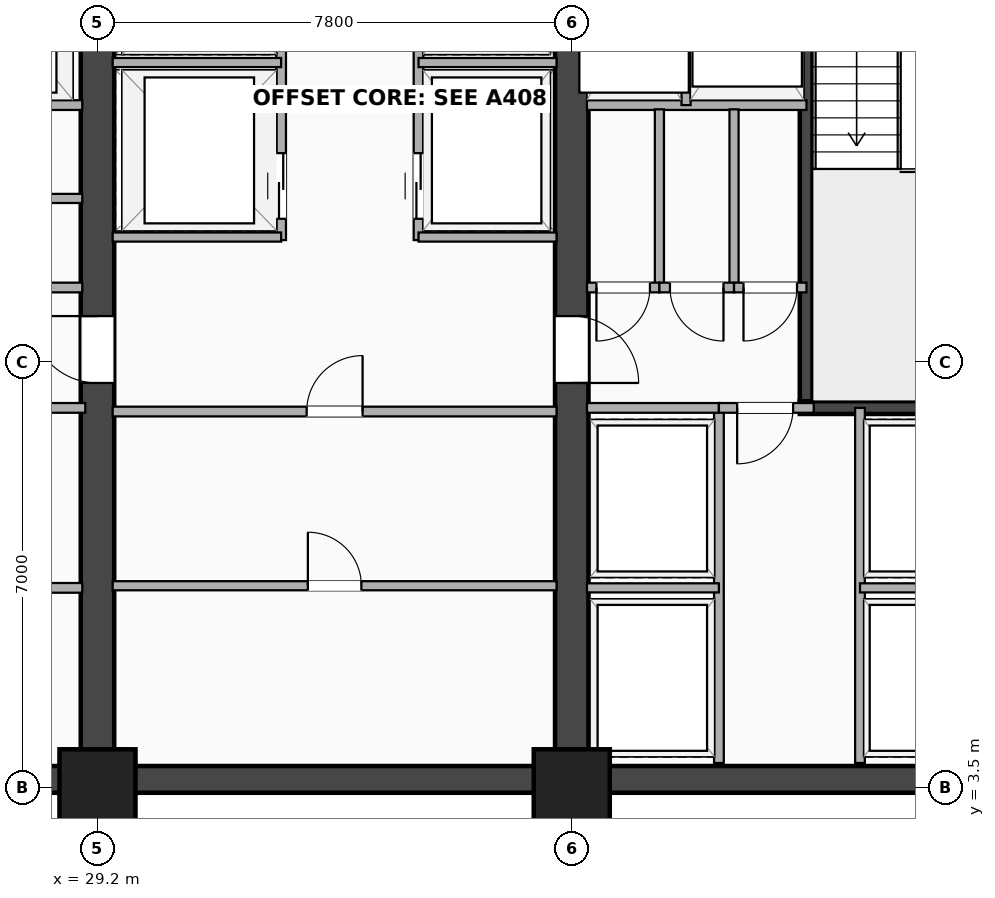
"""IFC4 building model, lengths in metres.
Left out: names, types, materials, properties, quantities, classifications, styles, units other than length and angle.
Written with IfcOpenShell. Run it as: python <this file> out.ifc"""

import sys

from ifc_helpers import new_model, si_unit, direction, frame, frame_2d, origin, origin_2d, place, context, subcontext, project, spatial, rectangle, extrude, element, fill, save


model = new_model("IFC4")
c1 = context("Model", 3, precision=1e-05, world=origin(), true_north=direction((0.0, 1.0)))
c2 = subcontext(c1, "Body", "Model", "MODEL_VIEW")
j1 = project(units=[si_unit("LENGTHUNIT", "METRE"), si_unit("PLANEANGLEUNIT", "RADIAN")], contexts=[c1])
p1 = place(None, origin())
s1 = spatial("IfcSite", under=j1, at=p1, CompositionType="ELEMENT")
p2 = place(p1, origin())
s2 = spatial("IfcBuilding", under=s1, at=p2, CompositionType="ELEMENT")
p3 = place(p2, frame((0.0, 0.0, 91.7)))
s3 = spatial("IfcBuildingStorey", under=s2, at=p3, CompositionType="ELEMENT", Elevation=91.7)
p4 = place(p3, frame((20.3, 3.63, 0.0), z_axis=(0.0, 0.0, 1.0), x_axis=(1.0, 0.0, 0.0)))
e1 = element("IfcWall", 1, at=p4, inside=s3, PredefinedType="SHEAR", context=c2, shape_type="SweptSolid", body=[
    extrude(rectangle(XDim=24.5, YDim=0.44, at=frame_2d((12.25, 0.0))), origin(), (0.0, 0.0, 1.0), 3.24),
])
p5 = place(p3, frame((29.2, 3.5, 0.0), z_axis=(0.0, 0.0, 1.0), x_axis=(0.0, 1.0, 0.0)))
e2 = element("IfcWall", 2, at=p5, inside=s3, PredefinedType="SHEAR", context=c2, shape_type="SweptSolid", body=[
    extrude(rectangle(XDim=16.9, YDim=0.55, at=frame_2d((8.45, 0.0))), origin(), (0.0, 0.0, 1.0), 3.24),
])
p6 = place(p5, frame((7.75, 0.0, 0.0), z_axis=(0.0, 0.0, 1.0), x_axis=(-1.0, 0.0, 0.0)))
e3 = element("IfcOpeningElement", 3, at=p6, cuts=e2, PredefinedType="OPENING", context=c2, shape_type="SweptSolid", body=[
    extrude(rectangle(XDim=1.1, YDim=2.15, at=frame_2d((0.55, 1.075))), frame((0.0, 0.285, 0.0), z_axis=(0.0, -1.0, 0.0), x_axis=(1.0, 0.0, 0.0)), (0.0, 0.0, 1.0), 0.57),
])
p7 = place(p3, frame((37.0, 3.5, 0.0), z_axis=(0.0, 0.0, 1.0), x_axis=(0.0, 1.0, 0.0)))
e4 = element("IfcWall", 4, at=p7, inside=s3, PredefinedType="SHEAR", context=c2, shape_type="SweptSolid", body=[
    extrude(rectangle(XDim=16.9, YDim=0.55, at=frame_2d((8.45, 0.0))), origin(), (0.0, 0.0, 1.0), 3.24),
])
p8 = place(p7, frame((6.65, 0.0, 0.0)))
e5 = element("IfcOpeningElement", 5, at=p8, cuts=e4, PredefinedType="OPENING", context=c2, shape_type="SweptSolid", body=[
    extrude(rectangle(XDim=1.1, YDim=2.15, at=frame_2d((0.55, 1.075))), frame((0.0, 0.285, 0.0), z_axis=(0.0, -1.0, 0.0), x_axis=(1.0, 0.0, 0.0)), (0.0, 0.0, 1.0), 0.57),
])
p9 = place(p3, frame((40.855, 9.745, 0.0), z_axis=(0.0, 0.0, 1.0), x_axis=(0.0, 1.0, 0.0)))
e6 = element("IfcWall", 6, at=p9, inside=s3, PredefinedType="SHEAR", context=c2, shape_type="SweptSolid", body=[
    extrude(rectangle(XDim=8.01, YDim=0.21, at=frame_2d((4.005, 0.0))), origin(), (0.0, 0.0, 1.0), 3.24),
])
p10 = place(p3, frame((40.75, 9.745, 0.0), z_axis=(0.0, 0.0, 1.0), x_axis=(1.0, 0.0, 0.0)))
e7 = element("IfcWall", 7, at=p10, inside=s3, PredefinedType="SHEAR", context=c2, shape_type="SweptSolid", body=[
    extrude(rectangle(XDim=3.66, YDim=0.21, at=frame_2d((1.83, 0.0))), origin(), (0.0, 0.0, 1.0), 3.24),
])
for number, where, z_axis, x_axis in (
    (8, (29.2, 3.5, -0.26), (0.0, 0.0, 1.0), (1.0, 0.0, 0.0)),
    (9, (37.0, 3.5, -0.26), (0.0, 0.0, 1.0), (1.0, 0.0, 0.0)),
):
    element("IfcColumn", number, at=place(p3, frame(where, z_axis=z_axis, x_axis=x_axis)), inside=s3, PredefinedType="COLUMN", context=c2, shape_type="SweptSolid", body=[
        extrude(rectangle(XDim=1.25, YDim=1.25, at=origin_2d()), origin(), (0.0, 0.0, 1.0), 3.5),
    ])
p11 = place(p3, frame((24.22, 14.72, 0.0), z_axis=(0.0, 0.0, 1.0), x_axis=(1.0, 0.0, 0.0)))
e10 = element("IfcWall", 10, at=p11, inside=s3, PredefinedType="PARTITIONING", context=c2, shape_type="SweptSolid", body=[
    extrude(rectangle(XDim=4.73, YDim=0.16, at=frame_2d((2.365, 0.0))), origin(), (0.0, 0.0, 1.0), 3.24),
])
p12 = place(p3, frame((37.25, 14.72, 0.0), z_axis=(0.0, 0.0, 1.0), x_axis=(1.0, 0.0, 0.0)))
e11 = element("IfcWall", 11, at=p12, inside=s3, PredefinedType="PARTITIONING", context=c2, shape_type="SweptSolid", body=[
    extrude(rectangle(XDim=3.61, YDim=0.16, at=frame_2d((1.805, 0.0))), origin(), (0.0, 0.0, 1.0), 3.24),
])
p13 = place(p3, frame((38.88, 14.72, 0.0), z_axis=(0.0, 0.0, 1.0), x_axis=(0.0, 1.0, 0.0)))
e12 = element("IfcWall", 12, at=p13, inside=s3, PredefinedType="PARTITIONING", context=c2, shape_type="SweptSolid", body=[
    extrude(rectangle(XDim=3.04, YDim=0.15, at=frame_2d((1.52, 0.0))), origin(), (0.0, 0.0, 1.0), 3.24),
])
p14 = place(p3, frame((24.22, 11.72, 0.0), z_axis=(0.0, 0.0, 1.0), x_axis=(1.0, 0.0, 0.0)))
e13 = element("IfcWall", 13, at=p14, inside=s3, PredefinedType="PARTITIONING", context=c2, shape_type="SweptSolid", body=[
    extrude(rectangle(XDim=4.73, YDim=0.16, at=frame_2d((2.365, 0.0))), origin(), (0.0, 0.0, 1.0), 3.24),
])
p15 = place(p14, frame((1.905, 0.0, 0.0)))
e14 = element("IfcOpeningElement", 14, at=p15, cuts=e13, PredefinedType="OPENING", context=c2, shape_type="SweptSolid", body=[
    extrude(rectangle(XDim=0.92, YDim=2.08, at=frame_2d((0.46, 1.04))), frame((0.0, 0.09, 0.0), z_axis=(0.0, -1.0, 0.0), x_axis=(1.0, 0.0, 0.0)), (0.0, 0.0, 1.0), 0.18),
])
p16 = place(p3, frame((24.22, 13.185, 0.0), z_axis=(0.0, 0.0, 1.0), x_axis=(1.0, 0.0, 0.0)))
e15 = element("IfcWall", 15, at=p16, inside=s3, PredefinedType="PARTITIONING", context=c2, shape_type="SweptSolid", body=[
    extrude(rectangle(XDim=4.73, YDim=0.15, at=frame_2d((2.365, 0.0))), origin(), (0.0, 0.0, 1.0), 3.24),
])
p17 = place(p16, frame((1.925, 0.0, 0.0)))
e16 = element("IfcOpeningElement", 16, at=p17, cuts=e15, PredefinedType="OPENING", context=c2, shape_type="SweptSolid", body=[
    extrude(rectangle(XDim=0.88, YDim=2.08, at=frame_2d((0.44, 1.04))), frame((0.0, 0.085, 0.0), z_axis=(0.0, -1.0, 0.0), x_axis=(1.0, 0.0, 0.0)), (0.0, 0.0, 1.0), 0.17),
])
p18 = place(p3, frame((38.441, 11.72, 0.0), z_axis=(0.0, 0.0, 1.0), x_axis=(0.0, 1.0, 0.0)))
e17 = element("IfcWall", 17, at=p18, inside=s3, PredefinedType="PARTITIONING", context=c2, shape_type="SweptSolid", body=[
    extrude(rectangle(XDim=2.93, YDim=0.15, at=frame_2d((1.465, 0.0))), origin(), (0.0, 0.0, 1.0), 3.24),
])
p19 = place(p3, frame((37.25, 11.72, 0.0), z_axis=(0.0, 0.0, 1.0), x_axis=(1.0, 0.0, 0.0)))
e18 = element("IfcWall", 18, at=p19, inside=s3, PredefinedType="PARTITIONING", context=c2, shape_type="SweptSolid", body=[
    extrude(rectangle(XDim=1.191, YDim=0.16, at=frame_2d((0.596, 0.0))), origin(), (0.0, 0.0, 1.0), 3.24),
])
p20 = place(p19, frame((0.156, 0.0, 0.0)))
e19 = element("IfcOpeningElement", 19, at=p20, cuts=e18, PredefinedType="OPENING", context=c2, shape_type="SweptSolid", body=[
    extrude(rectangle(XDim=0.88, YDim=2.08, at=frame_2d((0.44, 1.04))), frame((0.0, 0.09, 0.0), z_axis=(0.0, -1.0, 0.0), x_axis=(1.0, 0.0, 0.0)), (0.0, 0.0, 1.0), 0.18),
])
p21 = place(p3, frame((39.669, 11.72, 0.0), z_axis=(0.0, 0.0, 1.0), x_axis=(0.0, 1.0, 0.0)))
e20 = element("IfcWall", 20, at=p21, inside=s3, PredefinedType="PARTITIONING", context=c2, shape_type="SweptSolid", body=[
    extrude(rectangle(XDim=2.93, YDim=0.15, at=frame_2d((1.465, 0.0))), origin(), (0.0, 0.0, 1.0), 3.24),
])
p22 = place(p3, frame((38.441, 11.72, 0.0), z_axis=(0.0, 0.0, 1.0), x_axis=(1.0, 0.0, 0.0)))
e21 = element("IfcWall", 21, at=p22, inside=s3, PredefinedType="PARTITIONING", context=c2, shape_type="SweptSolid", body=[
    extrude(rectangle(XDim=1.227, YDim=0.16, at=frame_2d((0.614, 0.0))), origin(), (0.0, 0.0, 1.0), 3.24),
])
p23 = place(p22, frame((0.174, 0.0, 0.0)))
e22 = element("IfcOpeningElement", 22, at=p23, cuts=e21, PredefinedType="OPENING", context=c2, shape_type="SweptSolid", body=[
    extrude(rectangle(XDim=0.88, YDim=2.08, at=frame_2d((0.44, 1.04))), frame((0.0, 0.09, 0.0), z_axis=(0.0, -1.0, 0.0), x_axis=(1.0, 0.0, 0.0)), (0.0, 0.0, 1.0), 0.18),
])
p24 = place(p3, frame((39.669, 11.72, 0.0), z_axis=(0.0, 0.0, 1.0), x_axis=(1.0, 0.0, 0.0)))
e23 = element("IfcWall", 23, at=p24, inside=s3, PredefinedType="PARTITIONING", context=c2, shape_type="SweptSolid", body=[
    extrude(rectangle(XDim=1.191, YDim=0.16, at=frame_2d((0.596, 0.0))), origin(), (0.0, 0.0, 1.0), 3.24),
])
p25 = place(p24, frame((0.156, 0.0, 0.0)))
e24 = element("IfcOpeningElement", 24, at=p25, cuts=e23, PredefinedType="OPENING", context=c2, shape_type="SweptSolid", body=[
    extrude(rectangle(XDim=0.88, YDim=2.08, at=frame_2d((0.44, 1.04))), frame((0.0, 0.09, 0.0), z_axis=(0.0, -1.0, 0.0), x_axis=(1.0, 0.0, 0.0)), (0.0, 0.0, 1.0), 0.18),
])
p26 = place(p3, frame((20.65, 6.78, 0.0), z_axis=(0.0, 0.0, 1.0), x_axis=(1.0, 0.0, 0.0)))
e25 = element("IfcWall", 25, at=p26, inside=s3, PredefinedType="PARTITIONING", context=c2, shape_type="SweptSolid", body=[
    extrude(rectangle(XDim=8.3, YDim=0.16, at=frame_2d((4.15, 0.0))), origin(), (0.0, 0.0, 1.0), 2.313),
])
p27 = place(p26, frame((3.695, 0.0, 0.0)))
e26 = element("IfcOpeningElement", 26, at=p27, cuts=e25, PredefinedType="OPENING", context=c2, shape_type="SweptSolid", body=[
    extrude(rectangle(XDim=1.15, YDim=2.2, at=frame_2d((0.575, 1.1))), frame((0.0, 0.09, 0.0), z_axis=(0.0, -1.0, 0.0), x_axis=(1.0, 0.0, 0.0)), (0.0, 0.0, 1.0), 0.18),
])
p28 = place(p26, frame((5.492, 0.0, 0.0)))
e27 = element("IfcOpeningElement", 27, at=p28, cuts=e25, PredefinedType="OPENING", context=c2, shape_type="SweptSolid", body=[
    extrude(rectangle(XDim=1.15, YDim=2.2, at=frame_2d((0.575, 1.1))), frame((0.0, 0.09, 0.0), z_axis=(0.0, -1.0, 0.0), x_axis=(1.0, 0.0, 0.0)), (0.0, 0.0, 1.0), 0.18),
])
p29 = place(p26, frame((1.059, 0.0, 0.0)))
e28 = element("IfcOpeningElement", 28, at=p29, cuts=e25, PredefinedType="OPENING", context=c2, shape_type="SweptSolid", body=[
    extrude(rectangle(XDim=1.15, YDim=2.2, at=frame_2d((0.575, 1.1))), frame((0.0, 0.09, 0.0), z_axis=(0.0, -1.0, 0.0), x_axis=(1.0, 0.0, 0.0)), (0.0, 0.0, 1.0), 0.18),
])
p30 = place(p3, frame((24.2, 9.74, 0.0), z_axis=(0.0, 0.0, 1.0), x_axis=(1.0, 0.0, 0.0)))
e29 = element("IfcWall", 29, at=p30, inside=s3, PredefinedType="PARTITIONING", context=c2, shape_type="SweptSolid", body=[
    extrude(rectangle(XDim=4.8, YDim=0.16, at=frame_2d((2.4, 0.0))), origin(), (0.0, 0.0, 1.0), 3.24),
])
p31 = place(p30, frame((1.85, 0.0, 0.0)))
e30 = element("IfcOpeningElement", 30, at=p31, cuts=e29, PredefinedType="OPENING", context=c2, shape_type="SweptSolid", body=[
    extrude(rectangle(XDim=1.1, YDim=2.15, at=frame_2d((0.55, 1.075))), frame((0.0, 0.09, 0.0), z_axis=(0.0, -1.0, 0.0), x_axis=(1.0, 0.0, 0.0)), (0.0, 0.0, 1.0), 0.18),
])
for number, where, z_axis, x_axis in (
    (31, (39.42, 3.9, 0.0), (0.0, 0.0, 1.0), (0.0, 1.0, 0.0)),
    (32, (41.74, 3.9, 0.0), (0.0, 0.0, 1.0), (0.0, 1.0, 0.0)),
):
    element("IfcWall", number, at=place(p3, frame(where, z_axis=z_axis, x_axis=x_axis)), inside=s3, PredefinedType="PARTITIONING", context=c2, shape_type="SweptSolid", body=[
        extrude(rectangle(XDim=5.84, YDim=0.16, at=frame_2d((2.92, 0.0))), origin(), (0.0, 0.0, 1.0), 3.24),
    ])
p32 = place(p3, frame((37.25, 6.78, 0.0), z_axis=(0.0, 0.0, 1.0), x_axis=(1.0, 0.0, 0.0)))
e33 = element("IfcWall", 33, at=p32, inside=s3, PredefinedType="PARTITIONING", context=c2, shape_type="SweptSolid", body=[
    extrude(rectangle(XDim=2.17, YDim=0.15, at=frame_2d((1.085, 0.0))), origin(), (0.0, 0.0, 1.0), 3.24),
])
p33 = place(p3, frame((41.74, 6.78, 0.0), z_axis=(0.0, 0.0, 1.0), x_axis=(1.0, 0.0, 0.0)))
e34 = element("IfcWall", 34, at=p33, inside=s3, PredefinedType="PARTITIONING", context=c2, shape_type="SweptSolid", body=[
    extrude(rectangle(XDim=2.66, YDim=0.15, at=frame_2d((1.33, 0.0))), origin(), (0.0, 0.0, 1.0), 2.313),
])
p34 = place(p3, frame((37.25, 9.74, 0.0), z_axis=(0.0, 0.0, 1.0), x_axis=(1.0, 0.0, 0.0)))
e35 = element("IfcWall", 35, at=p34, inside=s3, PredefinedType="PARTITIONING", context=c2, shape_type="SweptSolid", body=[
    extrude(rectangle(XDim=2.17, YDim=0.16, at=frame_2d((1.085, 0.0))), origin(), (0.0, 0.0, 1.0), 3.24),
])
p35 = place(p3, frame((39.42, 9.74, 0.0), z_axis=(0.0, 0.0, 1.0), x_axis=(1.0, 0.0, 0.0)))
e36 = element("IfcWall", 36, at=p35, inside=s3, PredefinedType="PARTITIONING", context=c2, shape_type="SweptSolid", body=[
    extrude(rectangle(XDim=1.56, YDim=0.16, at=frame_2d((0.78, 0.0))), origin(), (0.0, 0.0, 1.0), 3.24),
])
p36 = place(p35, frame((0.3, 0.0, 0.0)))
e37 = element("IfcOpeningElement", 37, at=p36, cuts=e36, PredefinedType="OPENING", context=c2, shape_type="SweptSolid", body=[
    extrude(rectangle(XDim=0.92, YDim=2.08, at=frame_2d((0.46, 1.04))), frame((0.0, 0.09, 0.0), z_axis=(0.0, -1.0, 0.0), x_axis=(1.0, 0.0, 0.0)), (0.0, 0.0, 1.0), 0.18),
])
p37 = place(p3, frame((29.45, 9.68, 0.0), z_axis=(0.0, 0.0, 1.0), x_axis=(1.0, 0.0, 0.0)))
e38 = element("IfcWall", 38, at=p37, inside=s3, PredefinedType="PARTITIONING", context=c2, shape_type="SweptSolid", body=[
    extrude(rectangle(XDim=7.3, YDim=0.16, at=frame_2d((3.65, 0.0))), origin(), (0.0, 0.0, 1.0), 3.24),
])
p38 = place(p37, frame((4.11, 0.0, 0.0), z_axis=(0.0, 0.0, 1.0), x_axis=(-1.0, 0.0, 0.0)))
e39 = element("IfcOpeningElement", 39, at=p38, cuts=e38, PredefinedType="OPENING", context=c2, shape_type="SweptSolid", body=[
    extrude(rectangle(XDim=0.92, YDim=2.08, at=frame_2d((0.46, 1.04))), frame((0.0, 0.09, 0.0), z_axis=(0.0, -1.0, 0.0), x_axis=(1.0, 0.0, 0.0)), (0.0, 0.0, 1.0), 0.18),
])
p39 = place(p3, frame((29.45, 6.815, 0.0), z_axis=(0.0, 0.0, 1.0), x_axis=(1.0, 0.0, 0.0)))
e40 = element("IfcWall", 40, at=p39, inside=s3, PredefinedType="PARTITIONING", context=c2, shape_type="SweptSolid", body=[
    extrude(rectangle(XDim=7.3, YDim=0.15, at=frame_2d((3.65, 0.0))), origin(), (0.0, 0.0, 1.0), 3.24),
])
p40 = place(p39, frame((4.09, 0.0, 0.0), z_axis=(0.0, 0.0, 1.0), x_axis=(-1.0, 0.0, 0.0)))
e41 = element("IfcOpeningElement", 41, at=p40, cuts=e40, PredefinedType="OPENING", context=c2, shape_type="SweptSolid", body=[
    extrude(rectangle(XDim=0.88, YDim=2.08, at=frame_2d((0.44, 1.04))), frame((0.0, 0.085, 0.0), z_axis=(0.0, -1.0, 0.0), x_axis=(1.0, 0.0, 0.0)), (0.0, 0.0, 1.0), 0.17),
])
p41 = place(p3, frame((32.22, 12.5, 0.0), z_axis=(0.0, 0.0, 1.0), x_axis=(0.0, 1.0, 0.0)))
e42 = element("IfcWall", 42, at=p41, inside=s3, PredefinedType="PARTITIONING", context=c2, shape_type="SweptSolid", body=[
    extrude(rectangle(XDim=7.92, YDim=0.16, at=frame_2d((3.96, 0.0))), origin(), (0.0, 0.0, 1.0), 2.614),
])
p42 = place(p41, frame((1.43, 0.0, 0.0), z_axis=(0.0, 0.0, 1.0), x_axis=(-1.0, 0.0, 0.0)))
e43 = element("IfcOpeningElement", 43, at=p42, cuts=e42, PredefinedType="OPENING", context=c2, shape_type="SweptSolid", body=[
    extrude(rectangle(XDim=1.08, YDim=2.16, at=frame_2d((0.54, 1.08))), frame((0.0, 0.09, 0.0), z_axis=(0.0, -1.0, 0.0), x_axis=(1.0, 0.0, 0.0)), (0.0, 0.0, 1.0), 0.18),
])
p43 = place(p41, frame((4.33, 0.0, 0.0), z_axis=(0.0, 0.0, 1.0), x_axis=(-1.0, 0.0, 0.0)))
e44 = element("IfcOpeningElement", 44, at=p43, cuts=e42, PredefinedType="OPENING", context=c2, shape_type="SweptSolid", body=[
    extrude(rectangle(XDim=1.08, YDim=2.16, at=frame_2d((0.54, 1.08))), frame((0.0, 0.09, 0.0), z_axis=(0.0, -1.0, 0.0), x_axis=(1.0, 0.0, 0.0)), (0.0, 0.0, 1.0), 0.18),
])
p44 = place(p41, frame((6.1, 0.0, 0.0)))
e45 = element("IfcOpeningElement", 45, at=p44, cuts=e42, PredefinedType="OPENING", context=c2, shape_type="SweptSolid", body=[
    extrude(rectangle(XDim=0.88, YDim=2.08, at=frame_2d((0.44, 1.04))), frame((0.0, 0.09, 0.0), z_axis=(0.0, -1.0, 0.0), x_axis=(1.0, 0.0, 0.0)), (0.0, 0.0, 1.0), 0.18),
])
p45 = place(p3, frame((34.48, 12.5, 0.0), z_axis=(0.0, 0.0, 1.0), x_axis=(0.0, 1.0, 0.0)))
e46 = element("IfcWall", 46, at=p45, inside=s3, PredefinedType="PARTITIONING", context=c2, shape_type="SweptSolid", body=[
    extrude(rectangle(XDim=7.92, YDim=0.16, at=frame_2d((3.96, 0.0))), origin(), (0.0, 0.0, 1.0), 2.614),
])
p46 = place(p45, frame((0.35, 0.0, 0.0)))
e47 = element("IfcOpeningElement", 47, at=p46, cuts=e46, PredefinedType="OPENING", context=c2, shape_type="SweptSolid", body=[
    extrude(rectangle(XDim=1.08, YDim=2.16, at=frame_2d((0.54, 1.08))), frame((0.0, 0.09, 0.0), z_axis=(0.0, -1.0, 0.0), x_axis=(1.0, 0.0, 0.0)), (0.0, 0.0, 1.0), 0.18),
])
p47 = place(p45, frame((3.25, 0.0, 0.0)))
e48 = element("IfcOpeningElement", 48, at=p47, cuts=e46, PredefinedType="OPENING", context=c2, shape_type="SweptSolid", body=[
    extrude(rectangle(XDim=1.08, YDim=2.16, at=frame_2d((0.54, 1.08))), frame((0.0, 0.09, 0.0), z_axis=(0.0, -1.0, 0.0), x_axis=(1.0, 0.0, 0.0)), (0.0, 0.0, 1.0), 0.18),
])
p48 = place(p45, frame((6.98, 0.0, 0.0), z_axis=(0.0, 0.0, 1.0), x_axis=(-1.0, 0.0, 0.0)))
e49 = element("IfcOpeningElement", 49, at=p48, cuts=e46, PredefinedType="OPENING", context=c2, shape_type="SweptSolid", body=[
    extrude(rectangle(XDim=0.88, YDim=2.08, at=frame_2d((0.44, 1.04))), frame((0.0, 0.09, 0.0), z_axis=(0.0, -1.0, 0.0), x_axis=(1.0, 0.0, 0.0)), (0.0, 0.0, 1.0), 0.18),
])
p49 = place(p3, frame((29.45, 12.55, 0.0), z_axis=(0.0, 0.0, 1.0), x_axis=(1.0, 0.0, 0.0)))
e50 = element("IfcWall", 50, at=p49, inside=s3, PredefinedType="PARTITIONING", context=c2, shape_type="SweptSolid", body=[
    extrude(rectangle(XDim=2.77, YDim=0.15, at=frame_2d((1.385, 0.0))), origin(), (0.0, 0.0, 1.0), 3.24),
])
p50 = place(p3, frame((34.48, 12.55, 0.0), z_axis=(0.0, 0.0, 1.0), x_axis=(1.0, 0.0, 0.0)))
e51 = element("IfcWall", 51, at=p50, inside=s3, PredefinedType="PARTITIONING", context=c2, shape_type="SweptSolid", body=[
    extrude(rectangle(XDim=2.27, YDim=0.15, at=frame_2d((1.135, 0.0))), origin(), (0.0, 0.0, 1.0), 3.24),
])
p51 = place(p3, frame((29.45, 15.42, 0.0), z_axis=(0.0, 0.0, 1.0), x_axis=(1.0, 0.0, 0.0)))
e52 = element("IfcWall", 52, at=p51, inside=s3, PredefinedType="PARTITIONING", context=c2, shape_type="SweptSolid", body=[
    extrude(rectangle(XDim=2.77, YDim=0.15, at=frame_2d((1.385, 0.0))), origin(), (0.0, 0.0, 1.0), 3.24),
])
p52 = place(p3, frame((34.48, 15.42, 0.0), z_axis=(0.0, 0.0, 1.0), x_axis=(1.0, 0.0, 0.0)))
e53 = element("IfcWall", 53, at=p52, inside=s3, PredefinedType="PARTITIONING", context=c2, shape_type="SweptSolid", body=[
    extrude(rectangle(XDim=2.27, YDim=0.15, at=frame_2d((1.135, 0.0))), origin(), (0.0, 0.0, 1.0), 3.24),
])
p53 = place(p6, origin())
e54 = element("IfcDoor", 54, at=p53, inside=s3, OperationType="SINGLE_SWING_RIGHT", PredefinedType="DOOR", context=c2, shape_type="SweptSolid", body=[
    extrude(rectangle(XDim=1.1, YDim=2.15, at=frame_2d((0.55, 1.075))), frame((0.0, 0.025, 0.0), z_axis=(0.0, -1.0, 0.0), x_axis=(1.0, 0.0, 0.0)), (0.0, 0.0, 1.0), 0.05),
])
fill(e3, e54)
p54 = place(p8, origin())
e55 = element("IfcDoor", 55, at=p54, inside=s3, OperationType="SINGLE_SWING_LEFT", PredefinedType="DOOR", context=c2, shape_type="SweptSolid", body=[
    extrude(rectangle(XDim=1.1, YDim=2.15, at=frame_2d((0.55, 1.075))), frame((0.0, 0.025, 0.0), z_axis=(0.0, -1.0, 0.0), x_axis=(1.0, 0.0, 0.0)), (0.0, 0.0, 1.0), 0.05),
])
fill(e5, e55)
p55 = place(p20, origin())
e56 = element("IfcDoor", 56, at=p55, inside=s3, OperationType="SINGLE_SWING_LEFT", PredefinedType="DOOR", context=c2, shape_type="SweptSolid", body=[
    extrude(rectangle(XDim=0.88, YDim=2.08, at=frame_2d((0.44, 1.04))), frame((0.0, 0.025, 0.0), z_axis=(0.0, -1.0, 0.0), x_axis=(1.0, 0.0, 0.0)), (0.0, 0.0, 1.0), 0.05),
])
fill(e19, e56)
p56 = place(p23, origin())
e57 = element("IfcDoor", 57, at=p56, inside=s3, OperationType="SINGLE_SWING_RIGHT", PredefinedType="DOOR", context=c2, shape_type="SweptSolid", body=[
    extrude(rectangle(XDim=0.88, YDim=2.08, at=frame_2d((0.44, 1.04))), frame((0.0, 0.025, 0.0), z_axis=(0.0, -1.0, 0.0), x_axis=(1.0, 0.0, 0.0)), (0.0, 0.0, 1.0), 0.05),
])
fill(e22, e57)
p57 = place(p25, origin())
e58 = element("IfcDoor", 58, at=p57, inside=s3, OperationType="SINGLE_SWING_LEFT", PredefinedType="DOOR", context=c2, shape_type="SweptSolid", body=[
    extrude(rectangle(XDim=0.88, YDim=2.08, at=frame_2d((0.44, 1.04))), frame((0.0, 0.025, 0.0), z_axis=(0.0, -1.0, 0.0), x_axis=(1.0, 0.0, 0.0)), (0.0, 0.0, 1.0), 0.05),
])
fill(e24, e58)
p58 = place(p36, origin())
e59 = element("IfcDoor", 59, at=p58, inside=s3, OperationType="SINGLE_SWING_LEFT", PredefinedType="DOOR", context=c2, shape_type="SweptSolid", body=[
    extrude(rectangle(XDim=0.92, YDim=2.08, at=frame_2d((0.46, 1.04))), frame((0.0, 0.025, 0.0), z_axis=(0.0, -1.0, 0.0), x_axis=(1.0, 0.0, 0.0)), (0.0, 0.0, 1.0), 0.05),
])
fill(e37, e59)
p59 = place(p38, origin())
e60 = element("IfcDoor", 60, at=p59, inside=s3, OperationType="SINGLE_SWING_RIGHT", PredefinedType="DOOR", context=c2, shape_type="SweptSolid", body=[
    extrude(rectangle(XDim=0.92, YDim=2.08, at=frame_2d((0.46, 1.04))), frame((0.0, 0.025, 0.0), z_axis=(0.0, -1.0, 0.0), x_axis=(1.0, 0.0, 0.0)), (0.0, 0.0, 1.0), 0.05),
])
fill(e39, e60)
p60 = place(p40, origin())
e61 = element("IfcDoor", 61, at=p60, inside=s3, OperationType="SINGLE_SWING_LEFT", PredefinedType="DOOR", context=c2, shape_type="SweptSolid", body=[
    extrude(rectangle(XDim=0.88, YDim=2.08, at=frame_2d((0.44, 1.04))), frame((0.0, 0.025, 0.0), z_axis=(0.0, -1.0, 0.0), x_axis=(1.0, 0.0, 0.0)), (0.0, 0.0, 1.0), 0.05),
])
fill(e41, e61)
p61 = place(p42, origin())
e62 = element("IfcDoor", 62, at=p61, inside=s3, OperationType="DOUBLE_DOOR_SLIDING", PredefinedType="DOOR", context=c2, shape_type="SweptSolid", body=[
    extrude(rectangle(XDim=1.08, YDim=2.16, at=frame_2d((0.54, 1.08))), frame((0.0, 0.025, 0.0), z_axis=(0.0, -1.0, 0.0), x_axis=(1.0, 0.0, 0.0)), (0.0, 0.0, 1.0), 0.05),
])
fill(e43, e62)
p62 = place(p46, origin())
e63 = element("IfcDoor", 63, at=p62, inside=s3, OperationType="DOUBLE_DOOR_SLIDING", PredefinedType="DOOR", context=c2, shape_type="SweptSolid", body=[
    extrude(rectangle(XDim=1.08, YDim=2.16, at=frame_2d((0.54, 1.08))), frame((0.0, 0.025, 0.0), z_axis=(0.0, -1.0, 0.0), x_axis=(1.0, 0.0, 0.0)), (0.0, 0.0, 1.0), 0.05),
])
fill(e47, e63)
save(model, sys.argv[1])
